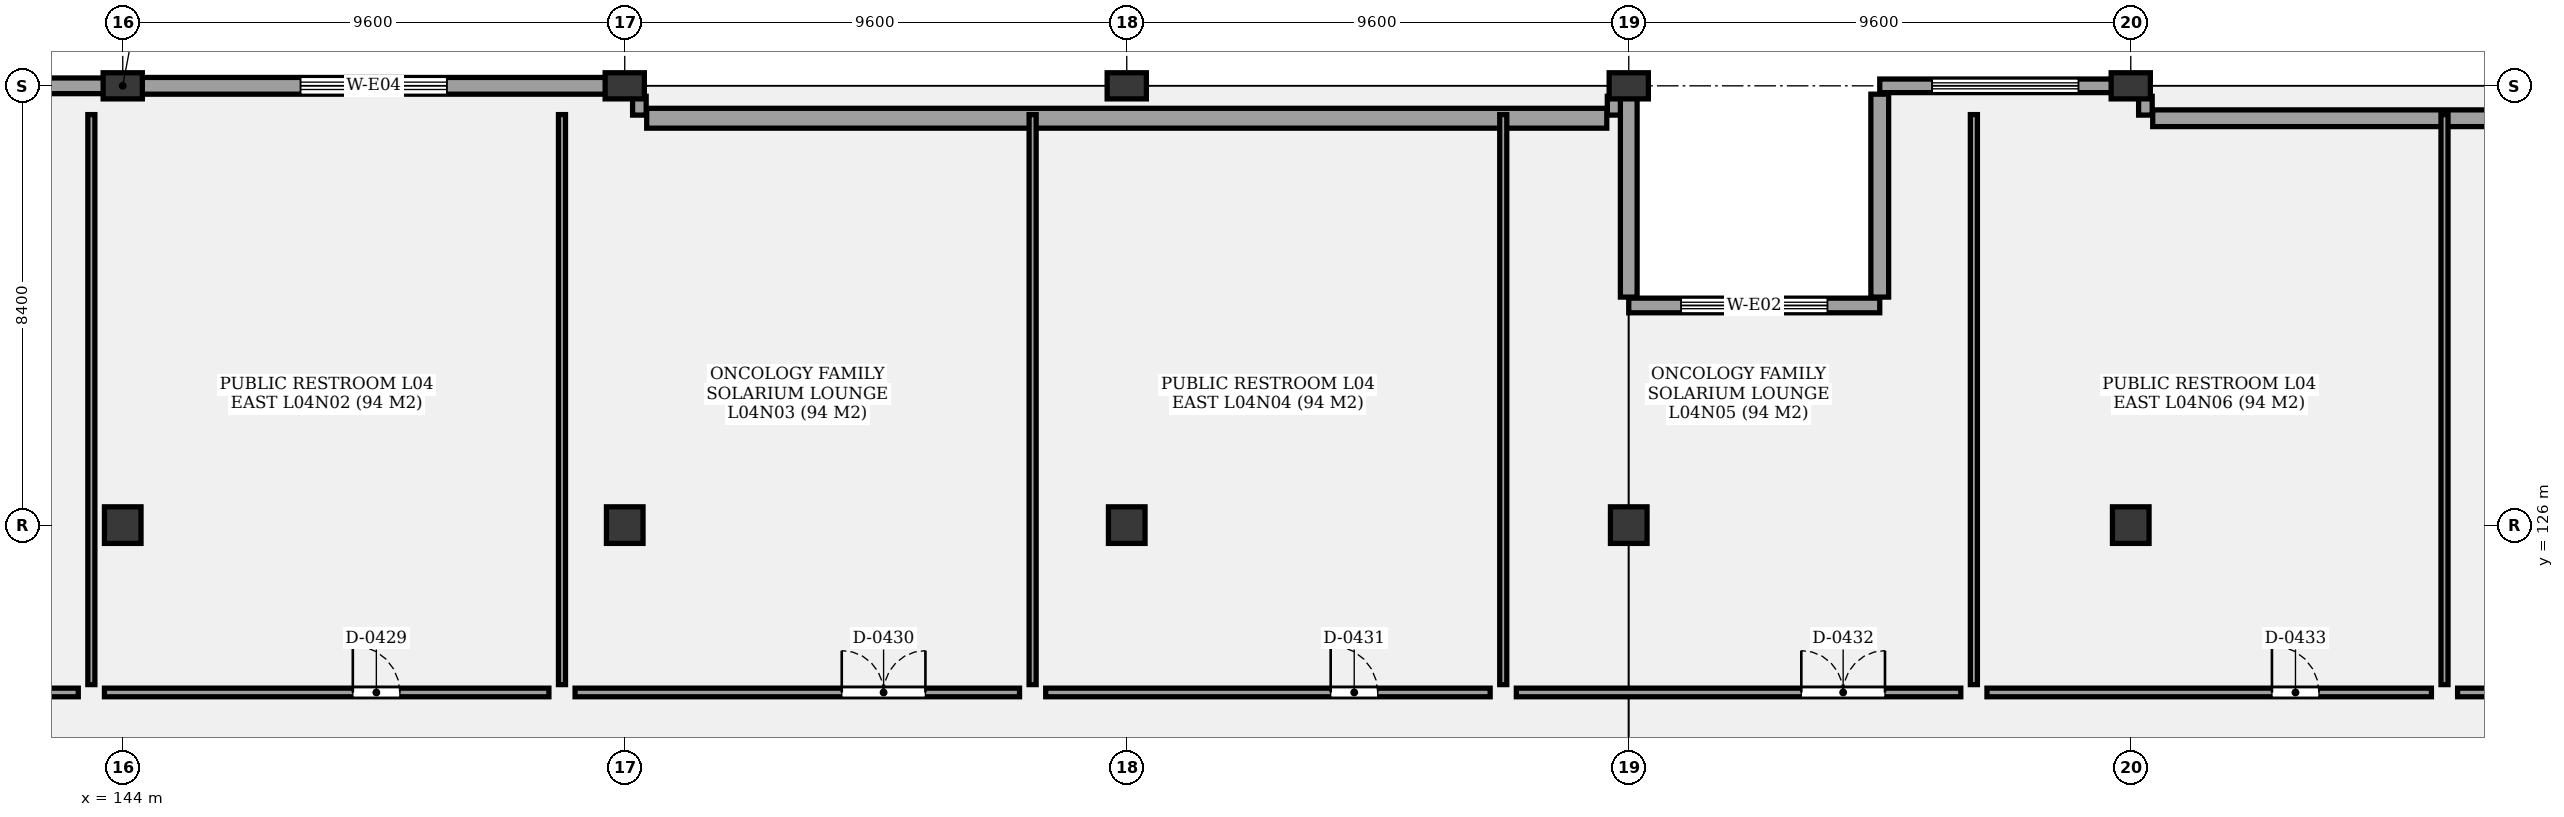
"""IFC4 building model, lengths in metres.
Left out: names, types, materials, properties, quantities, classifications, styles, units other than length and angle.
Written with IfcOpenShell. Run it as: python <this file> out.ifc"""

import sys

from ifc_helpers import new_model, si_unit, direction, frame, frame_2d, origin, origin_2d, place, context, subcontext, project, spatial, rectangle, extrude, element, fill, save


model = new_model("IFC4")
c1 = context("Model", 3, precision=1e-05, world=origin(), true_north=direction((0.0, 1.0)))
c2 = subcontext(c1, "Body", "Model", "MODEL_VIEW")
j1 = project(units=[si_unit("LENGTHUNIT", "METRE"), si_unit("PLANEANGLEUNIT", "RADIAN")], contexts=[c1])
p1 = place(None, origin())
s1 = spatial("IfcSite", under=j1, at=p1, CompositionType="ELEMENT")
p2 = place(p1, origin())
s2 = spatial("IfcBuilding", under=s1, at=p2, CompositionType="ELEMENT")
p3 = place(p2, frame((0.0, 0.0, 17.8)))
s3 = spatial("IfcBuildingStorey", under=s2, at=p3, CompositionType="ELEMENT", Elevation=17.8)
p4 = place(p3, frame((144.0, 126.0, 0.0), z_axis=(0.0, 0.0, 1.0), x_axis=(1.0, 0.0, 0.0)))
e1 = element("IfcColumn", 1, at=p4, inside=s3, PredefinedType="COLUMN", context=c2, shape_type="SweptSolid", body=[
    extrude(rectangle(XDim=0.7, YDim=0.7, at=origin_2d()), origin(), (0.0, 0.0, 1.0), 4.2),
])
p5 = place(p3, frame((144.0, 134.4, 0.0), z_axis=(0.0, 0.0, 1.0), x_axis=(1.0, 0.0, 0.0)))
e2 = element("IfcColumn", 2, at=p5, inside=s3, PredefinedType="COLUMN", context=c2, shape_type="SweptSolid", body=[
    extrude(rectangle(XDim=0.75, YDim=0.5, at=origin_2d()), origin(), (0.0, 0.0, 1.0), 4.2),
])
p6 = place(p3, frame((153.6, 126.0, 0.0), z_axis=(0.0, 0.0, 1.0), x_axis=(1.0, 0.0, 0.0)))
e3 = element("IfcColumn", 3, at=p6, inside=s3, PredefinedType="COLUMN", context=c2, shape_type="SweptSolid", body=[
    extrude(rectangle(XDim=0.7, YDim=0.7, at=origin_2d()), origin(), (0.0, 0.0, 1.0), 4.2),
])
p7 = place(p3, frame((153.6, 134.4, 0.0), z_axis=(0.0, 0.0, 1.0), x_axis=(1.0, 0.0, 0.0)))
e4 = element("IfcColumn", 4, at=p7, inside=s3, PredefinedType="COLUMN", context=c2, shape_type="SweptSolid", body=[
    extrude(rectangle(XDim=0.75, YDim=0.5, at=origin_2d()), origin(), (0.0, 0.0, 1.0), 4.2),
])
p8 = place(p3, frame((163.2, 126.0, 0.0), z_axis=(0.0, 0.0, 1.0), x_axis=(1.0, 0.0, 0.0)))
e5 = element("IfcColumn", 5, at=p8, inside=s3, PredefinedType="COLUMN", context=c2, shape_type="SweptSolid", body=[
    extrude(rectangle(XDim=0.7, YDim=0.7, at=origin_2d()), origin(), (0.0, 0.0, 1.0), 4.2),
])
p9 = place(p3, frame((163.2, 134.4, 0.0), z_axis=(0.0, 0.0, 1.0), x_axis=(1.0, 0.0, 0.0)))
e6 = element("IfcColumn", 6, at=p9, inside=s3, PredefinedType="COLUMN", context=c2, shape_type="SweptSolid", body=[
    extrude(rectangle(XDim=0.75, YDim=0.5, at=origin_2d()), origin(), (0.0, 0.0, 1.0), 4.2),
])
p10 = place(p3, frame((172.8, 126.0, 0.0), z_axis=(0.0, 0.0, 1.0), x_axis=(1.0, 0.0, 0.0)))
e7 = element("IfcColumn", 7, at=p10, inside=s3, PredefinedType="COLUMN", context=c2, shape_type="SweptSolid", body=[
    extrude(rectangle(XDim=0.7, YDim=0.7, at=origin_2d()), origin(), (0.0, 0.0, 1.0), 4.2),
])
p11 = place(p3, frame((172.8, 134.4, 0.0), z_axis=(0.0, 0.0, 1.0), x_axis=(1.0, 0.0, 0.0)))
e8 = element("IfcColumn", 8, at=p11, inside=s3, PredefinedType="COLUMN", context=c2, shape_type="SweptSolid", body=[
    extrude(rectangle(XDim=0.75, YDim=0.5, at=origin_2d()), origin(), (0.0, 0.0, 1.0), 4.2),
])
p12 = place(p3, frame((182.4, 126.0, 0.0), z_axis=(0.0, 0.0, 1.0), x_axis=(1.0, 0.0, 0.0)))
e9 = element("IfcColumn", 9, at=p12, inside=s3, PredefinedType="COLUMN", context=c2, shape_type="SweptSolid", body=[
    extrude(rectangle(XDim=0.7, YDim=0.7, at=origin_2d()), origin(), (0.0, 0.0, 1.0), 4.2),
])
p13 = place(p3, frame((182.4, 134.4, 0.0), z_axis=(0.0, 0.0, 1.0), x_axis=(1.0, 0.0, 0.0)))
e10 = element("IfcColumn", 10, at=p13, inside=s3, PredefinedType="COLUMN", context=c2, shape_type="SweptSolid", body=[
    extrude(rectangle(XDim=0.75, YDim=0.5, at=origin_2d()), origin(), (0.0, 0.0, 1.0), 4.2),
])
p14 = place(p3, frame((172.8, 130.2, 0.0), z_axis=(0.0, 0.0, 1.0), x_axis=(1.0, 0.0, 0.0)))
e11 = element("IfcWall", 11, at=p14, inside=s3, PredefinedType="SOLIDWALL", context=c2, shape_type="SweptSolid", body=[
    extrude(rectangle(XDim=4.8, YDim=0.28, at=frame_2d((2.4, 0.0))), origin(), (0.0, 0.0, 1.0), 3.39),
])
p15 = place(p14, frame((1.0, 0.0, 0.85)))
e12 = element("IfcOpeningElement", 12, at=p15, cuts=e11, PredefinedType="OPENING", context=c2, shape_type="SweptSolid", body=[
    extrude(rectangle(XDim=2.8, YDim=1.2, at=frame_2d((1.4, 0.6))), frame((0.0, 0.15, 0.0), z_axis=(0.0, -1.0, 0.0), x_axis=(1.0, 0.0, 0.0)), (0.0, 0.0, 1.0), 0.3),
])
p16 = place(p3, frame((134.4, 134.4, 0.0), z_axis=(0.0, 0.0, 1.0), x_axis=(1.0, 0.0, 0.0)))
e13 = element("IfcWall", 13, at=p16, inside=s3, PredefinedType="SOLIDWALL", context=c2, shape_type="SweptSolid", body=[
    extrude(rectangle(XDim=9.6, YDim=0.3, at=frame_2d((4.8, 0.0))), origin(), (0.0, 0.0, 1.0), 3.39),
])
p17 = place(p16, frame((2.197, 0.0, 0.85)))
e14 = element("IfcOpeningElement", 14, at=p17, cuts=e13, PredefinedType="OPENING", context=c2, shape_type="SweptSolid", body=[
    extrude(rectangle(XDim=1.15, YDim=1.4, at=frame_2d((0.575, 0.7))), frame((0.0, 0.16, 0.0), z_axis=(0.0, -1.0, 0.0), x_axis=(1.0, 0.0, 0.0)), (0.0, 0.0, 1.0), 0.32),
])
p18 = place(p16, frame((6.253, 0.0, 0.85)))
e15 = element("IfcOpeningElement", 15, at=p18, cuts=e13, PredefinedType="OPENING", context=c2, shape_type="SweptSolid", body=[
    extrude(rectangle(XDim=1.15, YDim=1.4, at=frame_2d((0.575, 0.7))), frame((0.0, 0.16, 0.0), z_axis=(0.0, -1.0, 0.0), x_axis=(1.0, 0.0, 0.0)), (0.0, 0.0, 1.0), 0.32),
])
p19 = place(p3, frame((144.0, 134.4, 0.0), z_axis=(0.0, 0.0, 1.0), x_axis=(1.0, 0.0, 0.0)))
e16 = element("IfcWall", 16, at=p19, inside=s3, PredefinedType="SOLIDWALL", context=c2, shape_type="SweptSolid", body=[
    extrude(rectangle(XDim=9.6, YDim=0.32, at=frame_2d((4.8, 0.0))), origin(), (0.0, 0.0, 1.0), 3.39),
])
p20 = place(p19, frame((3.4, 0.0, 0.85)))
e17 = element("IfcOpeningElement", 17, at=p20, cuts=e16, PredefinedType="OPENING", context=c2, shape_type="SweptSolid", body=[
    extrude(rectangle(XDim=2.8, YDim=1.2, at=frame_2d((1.4, 0.6))), frame((0.0, 0.17, 0.0), z_axis=(0.0, -1.0, 0.0), x_axis=(1.0, 0.0, 0.0)), (0.0, 0.0, 1.0), 0.34),
])
for number, where, z_axis, x_axis in (
    (18, (153.88, 134.2, 0.0), (0.0, 0.0, 1.0), (0.0, -1.0, 0.0)),
    (19, (172.52, 134.2, 0.0), (0.0, 0.0, 1.0), (0.0, -1.0, 0.0)),
):
    element("IfcWall", number, at=place(p3, frame(where, z_axis=z_axis, x_axis=x_axis)), inside=s3, PredefinedType="SOLIDWALL", context=c2, shape_type="SweptSolid", body=[
        extrude(rectangle(XDim=0.36, YDim=0.26, at=frame_2d((0.18, 0.0))), origin(), (0.0, 0.0, 1.0), 3.39),
    ])
p21 = place(p3, frame((154.02, 133.78, 0.0), z_axis=(0.0, 0.0, 1.0), x_axis=(1.0, 0.0, 0.0)))
e20 = element("IfcWall", 20, at=p21, inside=s3, PredefinedType="SOLIDWALL", context=c2, shape_type="SweptSolid", body=[
    extrude(rectangle(XDim=18.36, YDim=0.38, at=frame_2d((9.18, 0.0))), origin(), (0.0, 0.0, 1.0), 3.39),
])
p22 = place(p3, frame((177.6, 134.4, 0.0), z_axis=(0.0, 0.0, 1.0), x_axis=(1.0, 0.0, 0.0)))
e21 = element("IfcWall", 21, at=p22, inside=s3, PredefinedType="SOLIDWALL", context=c2, shape_type="SweptSolid", body=[
    extrude(rectangle(XDim=4.8, YDim=0.26, at=frame_2d((2.4, 0.0))), origin(), (0.0, 0.0, 1.0), 3.39),
])
p23 = place(p22, frame((1.0, 0.0, 0.85)))
e22 = element("IfcOpeningElement", 22, at=p23, cuts=e21, PredefinedType="OPENING", context=c2, shape_type="SweptSolid", body=[
    extrude(rectangle(XDim=2.8, YDim=1.2, at=frame_2d((1.4, 0.6))), frame((0.0, 0.14, 0.0), z_axis=(0.0, -1.0, 0.0), x_axis=(1.0, 0.0, 0.0)), (0.0, 0.0, 1.0), 0.28),
])
p24 = place(p3, frame((182.68, 134.2, 0.0), z_axis=(0.0, 0.0, 1.0), x_axis=(0.0, -1.0, 0.0)))
e23 = element("IfcWall", 23, at=p24, inside=s3, PredefinedType="SOLIDWALL", context=c2, shape_type="SweptSolid", body=[
    extrude(rectangle(XDim=0.36, YDim=0.26, at=frame_2d((0.18, 0.0))), origin(), (0.0, 0.0, 1.0), 3.39),
])
p25 = place(p3, frame((182.82, 133.78, 0.0), z_axis=(0.0, 0.0, 1.0), x_axis=(1.0, 0.0, 0.0)))
e24 = element("IfcWall", 24, at=p25, inside=s3, PredefinedType="SOLIDWALL", context=c2, shape_type="SweptSolid", body=[
    extrude(rectangle(XDim=8.76, YDim=0.32, at=frame_2d((4.38, 0.0))), origin(), (0.0, 0.0, 1.0), 3.39),
])
p26 = place(p3, frame((172.8, 134.24, 0.0), z_axis=(0.0, 0.0, 1.0), x_axis=(0.0, -1.0, 0.0)))
e25 = element("IfcWall", 25, at=p26, inside=s3, PredefinedType="SOLIDWALL", context=c2, shape_type="SweptSolid", body=[
    extrude(rectangle(XDim=3.88, YDim=0.32, at=frame_2d((1.94, 0.0))), origin(), (0.0, 0.0, 1.0), 3.39),
])
p27 = place(p3, frame((177.6, 130.36, 0.0), z_axis=(0.0, 0.0, 1.0), x_axis=(0.0, 1.0, 0.0)))
e26 = element("IfcWall", 26, at=p27, inside=s3, PredefinedType="SOLIDWALL", context=c2, shape_type="SweptSolid", body=[
    extrude(rectangle(XDim=3.88, YDim=0.34, at=frame_2d((1.94, 0.0))), origin(), (0.0, 0.0, 1.0), 3.39),
])
p28 = place(p3, frame((134.65, 122.8, 0.0), z_axis=(0.0, 0.0, 1.0), x_axis=(1.0, 0.0, 0.0)))
e27 = element("IfcWall", 27, at=p28, inside=s3, PredefinedType="PARTITIONING", context=c2, shape_type="SweptSolid", body=[
    extrude(rectangle(XDim=8.5, YDim=0.165, at=frame_2d((4.25, 0.0))), origin(), (0.0, 0.0, 1.0), 3.3),
])
p29 = place(p28, frame((4.75, 0.0, 0.0)))
e28 = element("IfcOpeningElement", 28, at=p29, cuts=e27, PredefinedType="OPENING", context=c2, shape_type="SweptSolid", body=[
    extrude(rectangle(XDim=1.6, YDim=2.2, at=frame_2d((0.8, 1.1))), frame((0.0, 0.093, 0.0), z_axis=(0.0, -1.0, 0.0), x_axis=(1.0, 0.0, 0.0)), (0.0, 0.0, 1.0), 0.185),
])
p30 = place(p3, frame((143.65, 122.8, 0.0), z_axis=(0.0, 0.0, 1.0), x_axis=(1.0, 0.0, 0.0)))
e29 = element("IfcWall", 29, at=p30, inside=s3, PredefinedType="PARTITIONING", context=c2, shape_type="SweptSolid", body=[
    extrude(rectangle(XDim=8.5, YDim=0.165, at=frame_2d((4.25, 0.0))), origin(), (0.0, 0.0, 1.0), 3.3),
])
p31 = place(p30, frame((4.75, 0.0, 0.0)))
e30 = element("IfcOpeningElement", 30, at=p31, cuts=e29, PredefinedType="OPENING", context=c2, shape_type="SweptSolid", body=[
    extrude(rectangle(XDim=0.9, YDim=2.1, at=frame_2d((0.45, 1.05))), frame((0.0, 0.093, 0.0), z_axis=(0.0, -1.0, 0.0), x_axis=(1.0, 0.0, 0.0)), (0.0, 0.0, 1.0), 0.185),
])
p32 = place(p3, frame((143.4, 122.95, 0.0), z_axis=(0.0, 0.0, 1.0), x_axis=(0.0, 1.0, 0.0)))
e31 = element("IfcWall", 31, at=p32, inside=s3, PredefinedType="PARTITIONING", context=c2, shape_type="SweptSolid", body=[
    extrude(rectangle(XDim=10.9, YDim=0.135, at=frame_2d((5.45, 0.0))), origin(), (0.0, 0.0, 1.0), 3.3),
])
p33 = place(p3, frame((152.65, 122.8, 0.0), z_axis=(0.0, 0.0, 1.0), x_axis=(1.0, 0.0, 0.0)))
e32 = element("IfcWall", 32, at=p33, inside=s3, PredefinedType="PARTITIONING", context=c2, shape_type="SweptSolid", body=[
    extrude(rectangle(XDim=8.5, YDim=0.165, at=frame_2d((4.25, 0.0))), origin(), (0.0, 0.0, 1.0), 3.3),
])
p34 = place(p33, frame((5.1, 0.0, 0.0)))
e33 = element("IfcOpeningElement", 33, at=p34, cuts=e32, PredefinedType="OPENING", context=c2, shape_type="SweptSolid", body=[
    extrude(rectangle(XDim=1.6, YDim=2.2, at=frame_2d((0.8, 1.1))), frame((0.0, 0.093, 0.0), z_axis=(0.0, -1.0, 0.0), x_axis=(1.0, 0.0, 0.0)), (0.0, 0.0, 1.0), 0.185),
])
p35 = place(p3, frame((152.4, 122.95, 0.0), z_axis=(0.0, 0.0, 1.0), x_axis=(0.0, 1.0, 0.0)))
e34 = element("IfcWall", 34, at=p35, inside=s3, PredefinedType="PARTITIONING", context=c2, shape_type="SweptSolid", body=[
    extrude(rectangle(XDim=10.9, YDim=0.135, at=frame_2d((5.45, 0.0))), origin(), (0.0, 0.0, 1.0), 3.3),
])
p36 = place(p3, frame((161.65, 122.8, 0.0), z_axis=(0.0, 0.0, 1.0), x_axis=(1.0, 0.0, 0.0)))
e35 = element("IfcWall", 35, at=p36, inside=s3, PredefinedType="PARTITIONING", context=c2, shape_type="SweptSolid", body=[
    extrude(rectangle(XDim=8.5, YDim=0.165, at=frame_2d((4.25, 0.0))), origin(), (0.0, 0.0, 1.0), 3.3),
])
p37 = place(p36, frame((5.45, 0.0, 0.0)))
e36 = element("IfcOpeningElement", 36, at=p37, cuts=e35, PredefinedType="OPENING", context=c2, shape_type="SweptSolid", body=[
    extrude(rectangle(XDim=0.9, YDim=2.1, at=frame_2d((0.45, 1.05))), frame((0.0, 0.093, 0.0), z_axis=(0.0, -1.0, 0.0), x_axis=(1.0, 0.0, 0.0)), (0.0, 0.0, 1.0), 0.185),
])
p38 = place(p3, frame((161.4, 122.95, 0.0), z_axis=(0.0, 0.0, 1.0), x_axis=(0.0, 1.0, 0.0)))
e37 = element("IfcWall", 37, at=p38, inside=s3, PredefinedType="PARTITIONING", context=c2, shape_type="SweptSolid", body=[
    extrude(rectangle(XDim=10.9, YDim=0.135, at=frame_2d((5.45, 0.0))), origin(), (0.0, 0.0, 1.0), 3.3),
])
p39 = place(p3, frame((170.65, 122.8, 0.0), z_axis=(0.0, 0.0, 1.0), x_axis=(1.0, 0.0, 0.0)))
e38 = element("IfcWall", 38, at=p39, inside=s3, PredefinedType="PARTITIONING", context=c2, shape_type="SweptSolid", body=[
    extrude(rectangle(XDim=8.5, YDim=0.165, at=frame_2d((4.25, 0.0))), origin(), (0.0, 0.0, 1.0), 3.3),
])
p40 = place(p39, frame((5.45, 0.0, 0.0)))
e39 = element("IfcOpeningElement", 39, at=p40, cuts=e38, PredefinedType="OPENING", context=c2, shape_type="SweptSolid", body=[
    extrude(rectangle(XDim=1.6, YDim=2.2, at=frame_2d((0.8, 1.1))), frame((0.0, 0.093, 0.0), z_axis=(0.0, -1.0, 0.0), x_axis=(1.0, 0.0, 0.0)), (0.0, 0.0, 1.0), 0.185),
])
p41 = place(p3, frame((170.4, 122.95, 0.0), z_axis=(0.0, 0.0, 1.0), x_axis=(0.0, 1.0, 0.0)))
e40 = element("IfcWall", 40, at=p41, inside=s3, PredefinedType="PARTITIONING", context=c2, shape_type="SweptSolid", body=[
    extrude(rectangle(XDim=10.9, YDim=0.135, at=frame_2d((5.45, 0.0))), origin(), (0.0, 0.0, 1.0), 3.3),
])
p42 = place(p3, frame((179.65, 122.8, 0.0), z_axis=(0.0, 0.0, 1.0), x_axis=(1.0, 0.0, 0.0)))
e41 = element("IfcWall", 41, at=p42, inside=s3, PredefinedType="PARTITIONING", context=c2, shape_type="SweptSolid", body=[
    extrude(rectangle(XDim=8.5, YDim=0.165, at=frame_2d((4.25, 0.0))), origin(), (0.0, 0.0, 1.0), 3.3),
])
p43 = place(p42, frame((5.45, 0.0, 0.0)))
e42 = element("IfcOpeningElement", 42, at=p43, cuts=e41, PredefinedType="OPENING", context=c2, shape_type="SweptSolid", body=[
    extrude(rectangle(XDim=0.9, YDim=2.1, at=frame_2d((0.45, 1.05))), frame((0.0, 0.093, 0.0), z_axis=(0.0, -1.0, 0.0), x_axis=(1.0, 0.0, 0.0)), (0.0, 0.0, 1.0), 0.185),
])
p44 = place(p3, frame((179.4, 122.95, 0.0), z_axis=(0.0, 0.0, 1.0), x_axis=(0.0, 1.0, 0.0)))
e43 = element("IfcWall", 43, at=p44, inside=s3, PredefinedType="PARTITIONING", context=c2, shape_type="SweptSolid", body=[
    extrude(rectangle(XDim=10.9, YDim=0.135, at=frame_2d((5.45, 0.0))), origin(), (0.0, 0.0, 1.0), 3.3),
])
p45 = place(p3, frame((188.65, 122.8, 0.0), z_axis=(0.0, 0.0, 1.0), x_axis=(1.0, 0.0, 0.0)))
e44 = element("IfcWall", 44, at=p45, inside=s3, PredefinedType="PARTITIONING", context=c2, shape_type="SweptSolid", body=[
    extrude(rectangle(XDim=8.5, YDim=0.165, at=frame_2d((4.25, 0.0))), origin(), (0.0, 0.0, 1.0), 3.3),
])
p46 = place(p45, frame((5.45, 0.0, 0.0)))
e45 = element("IfcOpeningElement", 45, at=p46, cuts=e44, PredefinedType="OPENING", context=c2, shape_type="SweptSolid", body=[
    extrude(rectangle(XDim=1.6, YDim=2.2, at=frame_2d((0.8, 1.1))), frame((0.0, 0.093, 0.0), z_axis=(0.0, -1.0, 0.0), x_axis=(1.0, 0.0, 0.0)), (0.0, 0.0, 1.0), 0.185),
])
p47 = place(p3, frame((188.4, 122.95, 0.0), z_axis=(0.0, 0.0, 1.0), x_axis=(0.0, 1.0, 0.0)))
e46 = element("IfcWall", 46, at=p47, inside=s3, PredefinedType="PARTITIONING", context=c2, shape_type="SweptSolid", body=[
    extrude(rectangle(XDim=10.9, YDim=0.135, at=frame_2d((5.45, 0.0))), origin(), (0.0, 0.0, 1.0), 3.3),
])
p48 = place(p15, origin())
e47 = element("IfcWindow", 47, at=p48, inside=s3, PartitioningType="SINGLE_PANEL", PredefinedType="WINDOW", context=c2, shape_type="SweptSolid", body=[
    extrude(rectangle(XDim=2.8, YDim=1.2, at=frame_2d((1.4, 0.6))), frame((0.0, 0.03, 0.0), z_axis=(0.0, -1.0, 0.0), x_axis=(1.0, 0.0, 0.0)), (0.0, 0.0, 1.0), 0.06),
])
fill(e12, e47)
p49 = place(p20, origin())
e48 = element("IfcWindow", 48, at=p49, inside=s3, PartitioningType="SINGLE_PANEL", PredefinedType="WINDOW", context=c2, shape_type="SweptSolid", body=[
    extrude(rectangle(XDim=2.8, YDim=1.2, at=frame_2d((1.4, 0.6))), frame((0.0, 0.03, 0.0), z_axis=(0.0, -1.0, 0.0), x_axis=(1.0, 0.0, 0.0)), (0.0, 0.0, 1.0), 0.06),
])
fill(e17, e48)
p50 = place(p23, origin())
e49 = element("IfcWindow", 49, at=p50, inside=s3, PartitioningType="SINGLE_PANEL", PredefinedType="WINDOW", context=c2, shape_type="SweptSolid", body=[
    extrude(rectangle(XDim=2.8, YDim=1.2, at=frame_2d((1.4, 0.6))), frame((0.0, 0.03, 0.0), z_axis=(0.0, -1.0, 0.0), x_axis=(1.0, 0.0, 0.0)), (0.0, 0.0, 1.0), 0.06),
])
fill(e22, e49)
p51 = place(p31, origin())
e50 = element("IfcDoor", 50, at=p51, inside=s3, OperationType="SINGLE_SWING_LEFT", PredefinedType="DOOR", context=c2, shape_type="SweptSolid", body=[
    extrude(rectangle(XDim=0.9, YDim=2.1, at=frame_2d((0.45, 1.05))), frame((0.0, 0.025, 0.0), z_axis=(0.0, -1.0, 0.0), x_axis=(1.0, 0.0, 0.0)), (0.0, 0.0, 1.0), 0.05),
])
fill(e30, e50)
p52 = place(p34, origin())
e51 = element("IfcDoor", 51, at=p52, inside=s3, OperationType="DOUBLE_DOOR_SINGLE_SWING", PredefinedType="DOOR", context=c2, shape_type="SweptSolid", body=[
    extrude(rectangle(XDim=1.6, YDim=2.2, at=frame_2d((0.8, 1.1))), frame((0.0, 0.025, 0.0), z_axis=(0.0, -1.0, 0.0), x_axis=(1.0, 0.0, 0.0)), (0.0, 0.0, 1.0), 0.05),
])
fill(e33, e51)
p53 = place(p37, origin())
e52 = element("IfcDoor", 52, at=p53, inside=s3, OperationType="SINGLE_SWING_LEFT", PredefinedType="DOOR", context=c2, shape_type="SweptSolid", body=[
    extrude(rectangle(XDim=0.9, YDim=2.1, at=frame_2d((0.45, 1.05))), frame((0.0, 0.025, 0.0), z_axis=(0.0, -1.0, 0.0), x_axis=(1.0, 0.0, 0.0)), (0.0, 0.0, 1.0), 0.05),
])
fill(e36, e52)
p54 = place(p40, origin())
e53 = element("IfcDoor", 53, at=p54, inside=s3, OperationType="DOUBLE_DOOR_SINGLE_SWING", PredefinedType="DOOR", context=c2, shape_type="SweptSolid", body=[
    extrude(rectangle(XDim=1.6, YDim=2.2, at=frame_2d((0.8, 1.1))), frame((0.0, 0.025, 0.0), z_axis=(0.0, -1.0, 0.0), x_axis=(1.0, 0.0, 0.0)), (0.0, 0.0, 1.0), 0.05),
])
fill(e39, e53)
p55 = place(p43, origin())
e54 = element("IfcDoor", 54, at=p55, inside=s3, OperationType="SINGLE_SWING_LEFT", PredefinedType="DOOR", context=c2, shape_type="SweptSolid", body=[
    extrude(rectangle(XDim=0.9, YDim=2.1, at=frame_2d((0.45, 1.05))), frame((0.0, 0.025, 0.0), z_axis=(0.0, -1.0, 0.0), x_axis=(1.0, 0.0, 0.0)), (0.0, 0.0, 1.0), 0.05),
])
fill(e42, e54)
save(model, sys.argv[1])
